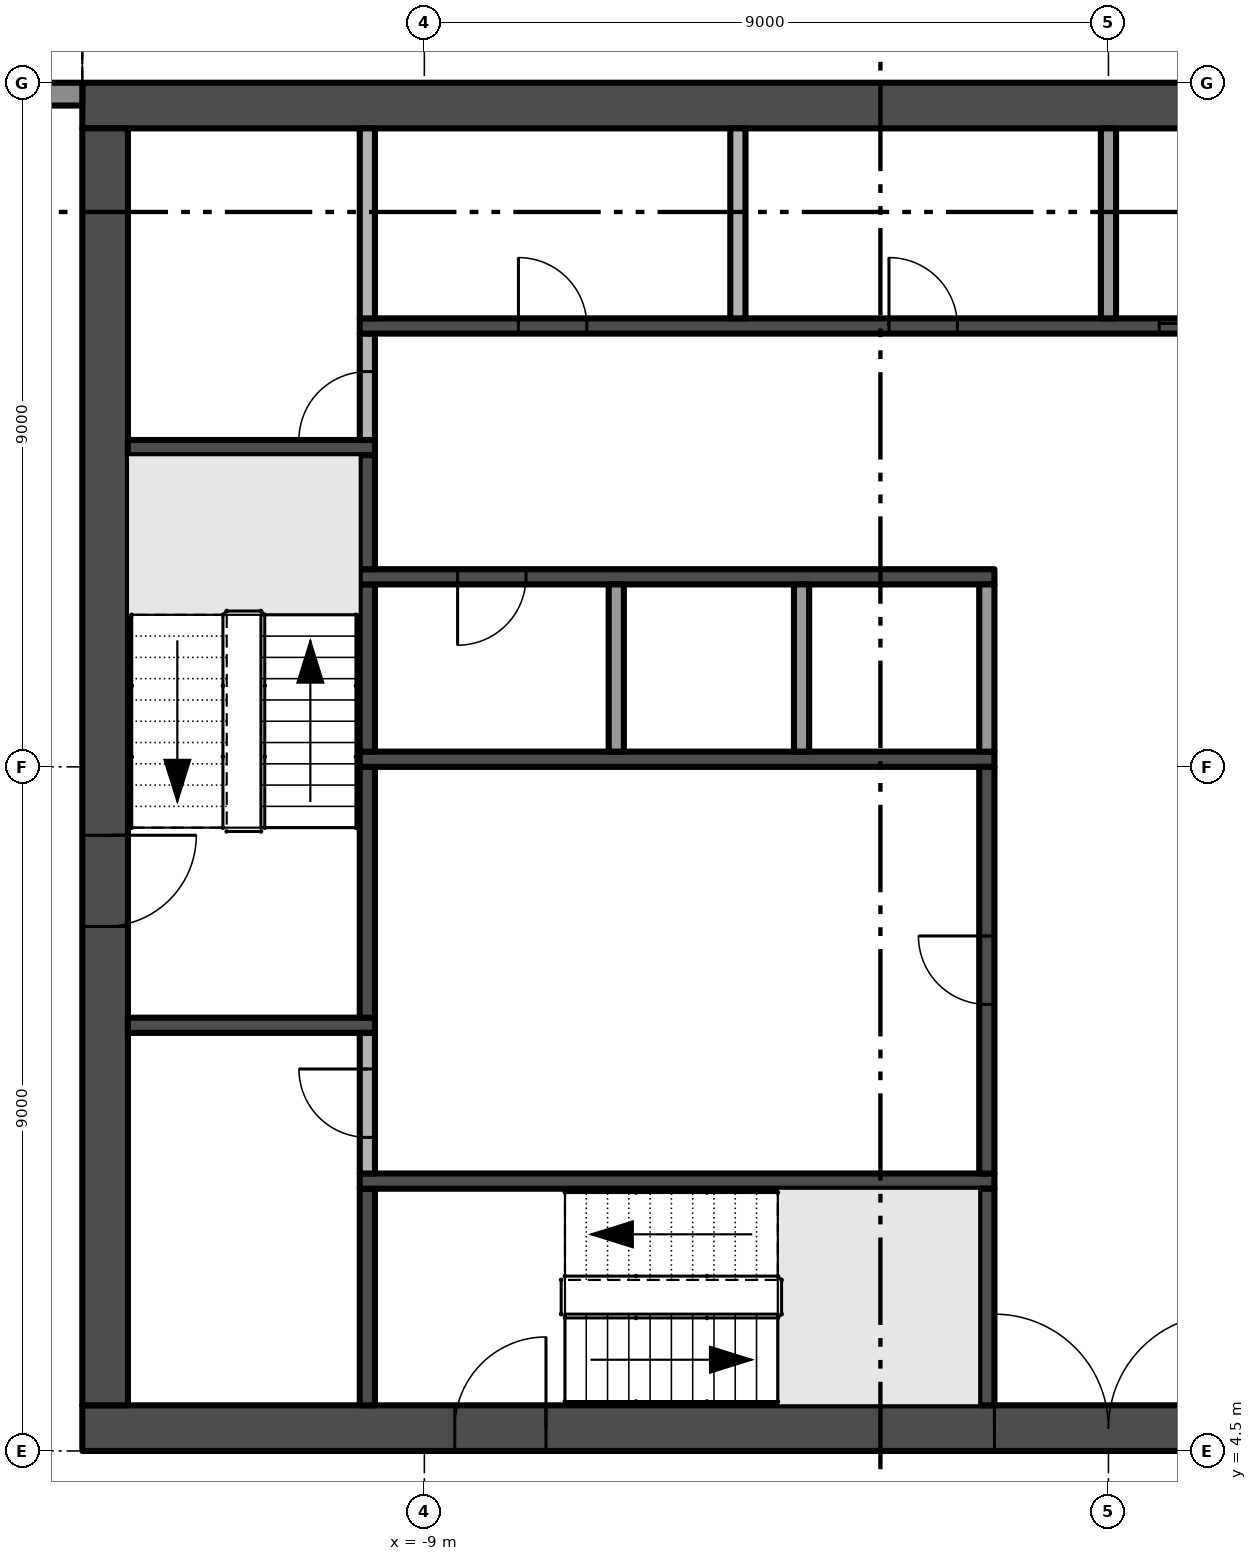
"""IFC4 building model, lengths in metres.
Left out: names, types, materials, properties, quantities, classifications, styles, units other than length and angle.
Written with IfcOpenShell. Run it as: python <this file> out.ifc"""

import sys

from ifc_helpers import new_model, si_unit, direction, frame, frame_2d, origin, place, context, subcontext, project, spatial, polyline, rectangle, outline, extrude, element, fill, save


model = new_model("IFC4")
c1 = context("Model", 3, precision=1e-05, world=origin(), true_north=direction((0.0, 1.0)))
c2 = subcontext(c1, "Body", "Model", "MODEL_VIEW")
j1 = project(units=[si_unit("LENGTHUNIT", "METRE"), si_unit("PLANEANGLEUNIT", "RADIAN")], contexts=[c1])
p1 = place(None, origin())
s1 = spatial("IfcSite", under=j1, at=p1, CompositionType="ELEMENT")
p2 = place(p1, origin())
s2 = spatial("IfcBuilding", under=s1, at=p2, CompositionType="ELEMENT")
p3 = place(p2, frame((0.0, 0.0, 199.6)))
s3 = spatial("IfcBuildingStorey", under=s2, at=p3, CompositionType="ELEMENT", Elevation=199.6)
p4 = place(p3, frame((-13.5, 4.8, -0.3), z_axis=(0.0, 0.0, 1.0), x_axis=(1.0, 0.0, 0.0)))
e1 = element("IfcWall", 1, at=p4, inside=s3, PredefinedType="SHEAR", context=c2, shape_type="SweptSolid", body=[
    extrude(rectangle(XDim=27.0, YDim=0.6, at=frame_2d((13.5, 0.0))), origin(), (0.0, 0.0, 1.0), 3.8),
])
p5 = place(p4, frame((12.0, 0.0, 0.3)))
e2 = element("IfcOpeningElement", 2, at=p5, cuts=e1, PredefinedType="OPENING", context=c2, shape_type="SweptSolid", body=[
    extrude(rectangle(XDim=3.0, YDim=2.4, at=frame_2d((1.5, 1.2))), frame((0.0, 0.31, 0.0), z_axis=(0.0, -1.0, 0.0), x_axis=(1.0, 0.0, 0.0)), (0.0, 0.0, 1.0), 0.62),
])
p6 = place(p4, frame((4.9, 0.0, 0.3)))
e3 = element("IfcOpeningElement", 3, at=p6, cuts=e1, PredefinedType="OPENING", context=c2, shape_type="SweptSolid", body=[
    extrude(rectangle(XDim=1.2, YDim=2.2, at=frame_2d((0.6, 1.1))), frame((0.0, 0.31, 0.0), z_axis=(0.0, -1.0, 0.0), x_axis=(1.0, 0.0, 0.0)), (0.0, 0.0, 1.0), 0.62),
])
p7 = place(p4, frame((20.75, 0.0, 0.3)))
e4 = element("IfcOpeningElement", 4, at=p7, cuts=e1, PredefinedType="OPENING", context=c2, shape_type="SweptSolid", body=[
    extrude(rectangle(XDim=1.5, YDim=2.2, at=frame_2d((0.75, 1.1))), frame((0.0, 0.31, 0.0), z_axis=(0.0, -1.0, 0.0), x_axis=(1.0, 0.0, 0.0)), (0.0, 0.0, 1.0), 0.62),
])
p8 = place(p4, frame((17.4, 0.0, 0.3)))
e5 = element("IfcOpeningElement", 5, at=p8, cuts=e1, PredefinedType="OPENING", context=c2, shape_type="SweptSolid", body=[
    extrude(rectangle(XDim=1.2, YDim=2.2, at=frame_2d((0.6, 1.1))), frame((0.0, 0.31, 0.0), z_axis=(0.0, -1.0, 0.0), x_axis=(1.0, 0.0, 0.0)), (0.0, 0.0, 1.0), 0.62),
])
p9 = place(p3, frame((13.5, 22.2, -0.3), z_axis=(0.0, 0.0, 1.0), x_axis=(-1.0, 0.0, 0.0)))
e6 = element("IfcWall", 6, at=p9, inside=s3, PredefinedType="SHEAR", context=c2, shape_type="SweptSolid", body=[
    extrude(rectangle(XDim=27.0, YDim=0.6, at=frame_2d((13.5, 0.0))), origin(), (0.0, 0.0, 1.0), 3.8),
])
p10 = place(p3, frame((-13.2, 21.9, -0.3), z_axis=(0.0, 0.0, 1.0), x_axis=(0.0, -1.0, 0.0)))
e7 = element("IfcWall", 7, at=p10, inside=s3, PredefinedType="SHEAR", context=c2, shape_type="SweptSolid", body=[
    extrude(rectangle(XDim=16.8, YDim=0.6, at=frame_2d((8.4, 0.0))), origin(), (0.0, 0.0, 1.0), 3.8),
])
p11 = place(p10, frame((9.3, 0.0, 0.3)))
e8 = element("IfcOpeningElement", 8, at=p11, cuts=e7, PredefinedType="OPENING", context=c2, shape_type="SweptSolid", body=[
    extrude(rectangle(XDim=1.2, YDim=2.2, at=frame_2d((0.6, 1.1))), frame((0.0, 0.31, 0.0), z_axis=(0.0, -1.0, 0.0), x_axis=(1.0, 0.0, 0.0)), (0.0, 0.0, 1.0), 0.62),
])
p12 = place(p3, frame((-17.5, 22.35, 0.0), z_axis=(0.0, 0.0, 1.0), x_axis=(1.0, 0.0, 0.0)))
e9 = element("IfcWall", 9, at=p12, inside=s3, PredefinedType="SOLIDWALL", context=c2, shape_type="SweptSolid", body=[
    extrude(rectangle(XDim=4.0, YDim=0.3, at=frame_2d((2.0, 0.0))), origin(), (0.0, 0.0, 1.0), 3.5),
])
p13 = place(p12, frame((0.3, 0.0, 0.45)))
e10 = element("IfcOpeningElement", 10, at=p13, cuts=e9, PredefinedType="OPENING", context=c2, shape_type="SweptSolid", body=[
    extrude(rectangle(XDim=3.075, YDim=2.65, at=frame_2d((1.538, 1.325))), frame((0.0, 0.16, 0.0), z_axis=(0.0, -1.0, 0.0), x_axis=(1.0, 0.0, 0.0)), (0.0, 0.0, 1.0), 0.32),
])
p14 = place(p3, origin())
e11 = element("IfcWall", 11, at=p14, inside=s3, PredefinedType="USERDEFINED", context=c2, shape_type="SweptSolid", body=[
    extrude(outline(polyline([(-13.5, 23.451), (-15.0, 23.115), (-15.375, 23.1), (-16.5, 23.231), (-18.0, 23.755), (-19.5, 24.488), (-21.0, 25.149), (-22.5, 25.485), (-22.555, 25.241), (-21.079, 24.91), (-19.605, 24.261), (-18.096, 23.524), (-16.556, 22.986), (-15.385, 22.849), (-14.967, 22.866), (-13.445, 23.208), (-13.5, 23.451)])), origin(), (0.0, 0.0, 1.0), 0.9),
])
for number, where, z_axis, x_axis in (
    (12, (-12.9, 10.1, 0.0), (0.0, 0.0, 1.0), (1.0, 0.0, 0.0)),
    (13, (-12.9, 17.7, 0.0), (0.0, 0.0, 1.0), (1.0, 0.0, 0.0)),
):
    element("IfcWall", number, at=place(p3, frame(where, z_axis=z_axis, x_axis=x_axis)), inside=s3, PredefinedType="SHEAR", context=c2, shape_type="SweptSolid", body=[
        extrude(rectangle(XDim=3.25, YDim=0.2, at=frame_2d((1.625, 0.0))), origin(), (0.0, 0.0, 1.0), 3.5),
    ])
p15 = place(p3, frame((-9.75, 5.1, 0.0), z_axis=(0.0, 0.0, 1.0), x_axis=(0.0, 1.0, 0.0)))
e14 = element("IfcWall", 14, at=p15, inside=s3, PredefinedType="SHEAR", context=c2, shape_type="SweptSolid", body=[
    extrude(rectangle(XDim=2.85, YDim=0.2, at=frame_2d((1.425, 0.0))), origin(), (0.0, 0.0, 1.0), 3.5),
])
p16 = place(p3, frame((-9.85, 8.05, 0.0), z_axis=(0.0, 0.0, 1.0), x_axis=(1.0, 0.0, 0.0)))
e15 = element("IfcWall", 15, at=p16, inside=s3, PredefinedType="SHEAR", context=c2, shape_type="SweptSolid", body=[
    extrude(rectangle(XDim=8.35, YDim=0.2, at=frame_2d((4.175, 0.0))), origin(), (0.0, 0.0, 1.0), 3.5),
])
p17 = place(p3, frame((-9.75, 8.15, 0.0), z_axis=(0.0, 0.0, 1.0), x_axis=(0.0, 1.0, 0.0)))
e16 = element("IfcWall", 16, at=p17, inside=s3, PredefinedType="PARTITIONING", context=c2, shape_type="SweptSolid", body=[
    extrude(rectangle(XDim=1.85, YDim=0.2, at=frame_2d((0.925, 0.0))), origin(), (0.0, 0.0, 1.0), 3.5),
])
p18 = place(p17, frame((0.475, 0.0, 0.0)))
e17 = element("IfcOpeningElement", 17, at=p18, cuts=e16, PredefinedType="OPENING", context=c2, shape_type="SweptSolid", body=[
    extrude(rectangle(XDim=0.9, YDim=2.1, at=frame_2d((0.45, 1.05))), frame((0.0, 0.11, 0.0), z_axis=(0.0, -1.0, 0.0), x_axis=(1.0, 0.0, 0.0)), (0.0, 0.0, 1.0), 0.22),
])
p19 = place(p3, frame((-9.75, 10.2, 0.0), z_axis=(0.0, 0.0, 1.0), x_axis=(0.0, 1.0, 0.0)))
e18 = element("IfcWall", 18, at=p19, inside=s3, PredefinedType="SHEAR", context=c2, shape_type="SweptSolid", body=[
    extrude(rectangle(XDim=3.3, YDim=0.2, at=frame_2d((1.65, 0.0))), origin(), (0.0, 0.0, 1.0), 3.5),
])
p20 = place(p3, frame((-9.85, 13.6, 0.0), z_axis=(0.0, 0.0, 1.0), x_axis=(1.0, 0.0, 0.0)))
e19 = element("IfcWall", 19, at=p20, inside=s3, PredefinedType="SHEAR", context=c2, shape_type="SweptSolid", body=[
    extrude(rectangle(XDim=8.35, YDim=0.2, at=frame_2d((4.175, 0.0))), origin(), (0.0, 0.0, 1.0), 3.5),
])
p21 = place(p3, frame((-9.75, 13.7, 0.0), z_axis=(0.0, 0.0, 1.0), x_axis=(0.0, 1.0, 0.0)))
e20 = element("IfcWall", 20, at=p21, inside=s3, PredefinedType="SHEAR", context=c2, shape_type="SweptSolid", body=[
    extrude(rectangle(XDim=2.2, YDim=0.2, at=frame_2d((1.1, 0.0))), origin(), (0.0, 0.0, 1.0), 3.5),
])
p22 = place(p3, frame((-1.5, 16.0, 0.0), z_axis=(0.0, 0.0, 1.0), x_axis=(-1.0, 0.0, 0.0)))
e21 = element("IfcWall", 21, at=p22, inside=s3, PredefinedType="SHEAR", context=c2, shape_type="SweptSolid", body=[
    extrude(rectangle(XDim=8.35, YDim=0.2, at=frame_2d((4.175, 0.0))), origin(), (0.0, 0.0, 1.0), 3.5),
])
p23 = place(p22, frame((6.162, 0.0, 0.0)))
e22 = element("IfcOpeningElement", 22, at=p23, cuts=e21, PredefinedType="OPENING", context=c2, shape_type="SweptSolid", body=[
    extrude(rectangle(XDim=0.9, YDim=2.1, at=frame_2d((0.45, 1.05))), frame((0.0, 0.11, 0.0), z_axis=(0.0, -1.0, 0.0), x_axis=(1.0, 0.0, 0.0)), (0.0, 0.0, 1.0), 0.22),
])
p24 = place(p3, frame((-9.75, 16.1, 0.0), z_axis=(0.0, 0.0, 1.0), x_axis=(0.0, 1.0, 0.0)))
e23 = element("IfcWall", 23, at=p24, inside=s3, PredefinedType="SHEAR", context=c2, shape_type="SweptSolid", body=[
    extrude(rectangle(XDim=1.5, YDim=0.2, at=frame_2d((0.75, 0.0))), origin(), (0.0, 0.0, 1.0), 3.5),
])
p25 = place(p3, frame((-9.75, 17.8, 0.0), z_axis=(0.0, 0.0, 1.0), x_axis=(0.0, 1.0, 0.0)))
e24 = element("IfcWall", 24, at=p25, inside=s3, PredefinedType="PARTITIONING", context=c2, shape_type="SweptSolid", body=[
    extrude(rectangle(XDim=1.4, YDim=0.2, at=frame_2d((0.7, 0.0))), origin(), (0.0, 0.0, 1.0), 3.5),
])
p26 = place(p25, origin())
e25 = element("IfcOpeningElement", 25, at=p26, cuts=e24, PredefinedType="OPENING", context=c2, shape_type="SweptSolid", body=[
    extrude(rectangle(XDim=0.9, YDim=2.1, at=frame_2d((0.45, 1.05))), frame((0.0, 0.11, 0.0), z_axis=(0.0, -1.0, 0.0), x_axis=(1.0, 0.0, 0.0)), (0.0, 0.0, 1.0), 0.22),
])
p27 = place(p3, frame((-9.85, 19.3, 0.0), z_axis=(0.0, 0.0, 1.0), x_axis=(1.0, 0.0, 0.0)))
e26 = element("IfcWall", 26, at=p27, inside=s3, PredefinedType="SHEAR", context=c2, shape_type="SweptSolid", body=[
    extrude(rectangle(XDim=19.7, YDim=0.2, at=frame_2d((9.85, 0.0))), origin(), (0.0, 0.0, 1.0), 3.5),
])
p28 = place(p27, frame((10.519, 0.0, 0.0)))
e27 = element("IfcOpeningElement", 27, at=p28, cuts=e26, PredefinedType="OPENING", context=c2, shape_type="SweptSolid", body=[
    extrude(rectangle(XDim=1.1, YDim=2.1, at=frame_2d((0.55, 1.05))), frame((0.0, 0.11, 0.0), z_axis=(0.0, -1.0, 0.0), x_axis=(1.0, 0.0, 0.0)), (0.0, 0.0, 1.0), 0.22),
])
p29 = place(p27, frame((12.956, 0.0, 0.0)))
e28 = element("IfcOpeningElement", 28, at=p29, cuts=e26, PredefinedType="OPENING", context=c2, shape_type="SweptSolid", body=[
    extrude(rectangle(XDim=1.1, YDim=2.1, at=frame_2d((0.55, 1.05))), frame((0.0, 0.11, 0.0), z_axis=(0.0, -1.0, 0.0), x_axis=(1.0, 0.0, 0.0)), (0.0, 0.0, 1.0), 0.22),
])
p30 = place(p27, frame((15.394, 0.0, 0.0)))
e29 = element("IfcOpeningElement", 29, at=p30, cuts=e26, PredefinedType="OPENING", context=c2, shape_type="SweptSolid", body=[
    extrude(rectangle(XDim=1.1, YDim=2.1, at=frame_2d((0.55, 1.05))), frame((0.0, 0.11, 0.0), z_axis=(0.0, -1.0, 0.0), x_axis=(1.0, 0.0, 0.0)), (0.0, 0.0, 1.0), 0.22),
])
p31 = place(p27, frame((17.831, 0.0, 0.0)))
e30 = element("IfcOpeningElement", 30, at=p31, cuts=e26, PredefinedType="OPENING", context=c2, shape_type="SweptSolid", body=[
    extrude(rectangle(XDim=1.1, YDim=2.1, at=frame_2d((0.55, 1.05))), frame((0.0, 0.11, 0.0), z_axis=(0.0, -1.0, 0.0), x_axis=(1.0, 0.0, 0.0)), (0.0, 0.0, 1.0), 0.22),
])
p32 = place(p27, frame((2.087, 0.0, 0.0)))
e31 = element("IfcOpeningElement", 31, at=p32, cuts=e26, PredefinedType="OPENING", context=c2, shape_type="SweptSolid", body=[
    extrude(rectangle(XDim=0.9, YDim=2.1, at=frame_2d((0.45, 1.05))), frame((0.0, 0.11, 0.0), z_axis=(0.0, -1.0, 0.0), x_axis=(1.0, 0.0, 0.0)), (0.0, 0.0, 1.0), 0.22),
])
p33 = place(p27, frame((6.963, 0.0, 0.0)))
e32 = element("IfcOpeningElement", 32, at=p33, cuts=e26, PredefinedType="OPENING", context=c2, shape_type="SweptSolid", body=[
    extrude(rectangle(XDim=0.9, YDim=2.1, at=frame_2d((0.45, 1.05))), frame((0.0, 0.11, 0.0), z_axis=(0.0, -1.0, 0.0), x_axis=(1.0, 0.0, 0.0)), (0.0, 0.0, 1.0), 0.22),
])
p34 = place(p3, frame((-9.75, 19.4, 0.0), z_axis=(0.0, 0.0, 1.0), x_axis=(0.0, 1.0, 0.0)))
e33 = element("IfcWall", 33, at=p34, inside=s3, PredefinedType="PARTITIONING", context=c2, shape_type="SweptSolid", body=[
    extrude(rectangle(XDim=2.5, YDim=0.2, at=frame_2d((1.25, 0.0))), origin(), (0.0, 0.0, 1.0), 3.5),
])
p35 = place(p3, frame((-6.475, 13.7, 0.0), z_axis=(0.0, 0.0, 1.0), x_axis=(0.0, 1.0, 0.0)))
e34 = element("IfcWall", 34, at=p35, inside=s3, PredefinedType="PARTITIONING", context=c2, shape_type="SweptSolid", body=[
    extrude(rectangle(XDim=2.2, YDim=0.2, at=frame_2d((1.1, 0.0))), origin(), (0.0, 0.0, 1.0), 3.5),
])
p36 = place(p3, frame((-4.875, 19.4, 0.0), z_axis=(0.0, 0.0, 1.0), x_axis=(0.0, 1.0, 0.0)))
e35 = element("IfcWall", 35, at=p36, inside=s3, PredefinedType="PARTITIONING", context=c2, shape_type="SweptSolid", body=[
    extrude(rectangle(XDim=2.5, YDim=0.2, at=frame_2d((1.25, 0.0))), origin(), (0.0, 0.0, 1.0), 3.5),
])
p37 = place(p3, frame((-4.037, 13.7, 0.0), z_axis=(0.0, 0.0, 1.0), x_axis=(0.0, 1.0, 0.0)))
e36 = element("IfcWall", 36, at=p37, inside=s3, PredefinedType="PARTITIONING", context=c2, shape_type="SweptSolid", body=[
    extrude(rectangle(XDim=2.2, YDim=0.2, at=frame_2d((1.1, 0.0))), origin(), (0.0, 0.0, 1.0), 3.5),
])
p38 = place(p3, frame((-1.6, 5.1, 0.0), z_axis=(0.0, 0.0, 1.0), x_axis=(0.0, 1.0, 0.0)))
e37 = element("IfcWall", 37, at=p38, inside=s3, PredefinedType="SHEAR", context=c2, shape_type="SweptSolid", body=[
    extrude(rectangle(XDim=2.85, YDim=0.2, at=frame_2d((1.425, 0.0))), origin(), (0.0, 0.0, 1.0), 3.5),
])
p39 = place(p3, frame((-1.6, 8.15, 0.0), z_axis=(0.0, 0.0, 1.0), x_axis=(0.0, 1.0, 0.0)))
e38 = element("IfcWall", 38, at=p39, inside=s3, PredefinedType="SHEAR", context=c2, shape_type="SweptSolid", body=[
    extrude(rectangle(XDim=5.35, YDim=0.2, at=frame_2d((2.675, 0.0))), origin(), (0.0, 0.0, 1.0), 3.5),
])
p40 = place(p39, frame((2.225, 0.0, 0.0)))
e39 = element("IfcOpeningElement", 39, at=p40, cuts=e38, PredefinedType="OPENING", context=c2, shape_type="SweptSolid", body=[
    extrude(rectangle(XDim=0.9, YDim=2.1, at=frame_2d((0.45, 1.05))), frame((0.0, 0.11, 0.0), z_axis=(0.0, -1.0, 0.0), x_axis=(1.0, 0.0, 0.0)), (0.0, 0.0, 1.0), 0.22),
])
p41 = place(p3, frame((-1.6, 13.7, 0.0), z_axis=(0.0, 0.0, 1.0), x_axis=(0.0, 1.0, 0.0)))
e40 = element("IfcWall", 40, at=p41, inside=s3, PredefinedType="PARTITIONING", context=c2, shape_type="SweptSolid", body=[
    extrude(rectangle(XDim=2.2, YDim=0.2, at=frame_2d((1.1, 0.0))), origin(), (0.0, 0.0, 1.0), 3.5),
])
p42 = place(p3, frame((0.0, 19.4, 0.0), z_axis=(0.0, 0.0, 1.0), x_axis=(0.0, 1.0, 0.0)))
e41 = element("IfcWall", 41, at=p42, inside=s3, PredefinedType="PARTITIONING", context=c2, shape_type="SweptSolid", body=[
    extrude(rectangle(XDim=2.5, YDim=0.2, at=frame_2d((1.25, 0.0))), origin(), (0.0, 0.0, 1.0), 3.5),
])
p43 = place(p5, frame((3.0, 0.0, 0.0), z_axis=(0.0, 0.0, 1.0), x_axis=(-1.0, 0.0, 0.0)))
e42 = element("IfcDoor", 42, at=p43, inside=s3, OperationType="DOUBLE_DOOR_SINGLE_SWING", PredefinedType="DOOR", context=c2, shape_type="SweptSolid", body=[
    extrude(rectangle(XDim=3.0, YDim=2.4, at=frame_2d((1.5, 1.2))), frame((0.0, 0.025, 0.0), z_axis=(0.0, -1.0, 0.0), x_axis=(1.0, 0.0, 0.0)), (0.0, 0.0, 1.0), 0.05),
])
fill(e2, e42)
p44 = place(p11, frame((1.2, 0.0, 0.0), z_axis=(0.0, 0.0, 1.0), x_axis=(-1.0, 0.0, 0.0)))
e43 = element("IfcDoor", 43, at=p44, inside=s3, OperationType="SINGLE_SWING_RIGHT", PredefinedType="DOOR", context=c2, shape_type="SweptSolid", body=[
    extrude(rectangle(XDim=1.2, YDim=2.2, at=frame_2d((0.6, 1.1))), frame((0.0, 0.025, 0.0), z_axis=(0.0, -1.0, 0.0), x_axis=(1.0, 0.0, 0.0)), (0.0, 0.0, 1.0), 0.05),
])
fill(e8, e43)
p45 = place(p6, frame((1.2, 0.0, 0.0), z_axis=(0.0, 0.0, 1.0), x_axis=(-1.0, 0.0, 0.0)))
e44 = element("IfcDoor", 44, at=p45, inside=s3, OperationType="SINGLE_SWING_LEFT", PredefinedType="DOOR", context=c2, shape_type="SweptSolid", body=[
    extrude(rectangle(XDim=1.2, YDim=2.2, at=frame_2d((0.6, 1.1))), frame((0.0, 0.025, 0.0), z_axis=(0.0, -1.0, 0.0), x_axis=(1.0, 0.0, 0.0)), (0.0, 0.0, 1.0), 0.05),
])
fill(e3, e44)
p46 = place(p28, origin())
e45 = element("IfcDoor", 45, at=p46, inside=s3, OperationType="SLIDING_TO_RIGHT", PredefinedType="DOOR", context=c2, shape_type="SweptSolid", body=[
    extrude(rectangle(XDim=1.1, YDim=2.1, at=frame_2d((0.55, 1.05))), frame((0.0, 0.025, 0.0), z_axis=(0.0, -1.0, 0.0), x_axis=(1.0, 0.0, 0.0)), (0.0, 0.0, 1.0), 0.05),
])
fill(e27, e45)
p47 = place(p40, origin())
e46 = element("IfcDoor", 46, at=p47, inside=s3, OperationType="SINGLE_SWING_RIGHT", PredefinedType="DOOR", context=c2, shape_type="SweptSolid", body=[
    extrude(rectangle(XDim=0.9, YDim=2.1, at=frame_2d((0.45, 1.05))), frame((0.0, 0.025, 0.0), z_axis=(0.0, -1.0, 0.0), x_axis=(1.0, 0.0, 0.0)), (0.0, 0.0, 1.0), 0.05),
])
fill(e39, e46)
p48 = place(p23, origin())
e47 = element("IfcDoor", 47, at=p48, inside=s3, OperationType="SINGLE_SWING_RIGHT", PredefinedType="DOOR", context=c2, shape_type="SweptSolid", body=[
    extrude(rectangle(XDim=0.9, YDim=2.1, at=frame_2d((0.45, 1.05))), frame((0.0, 0.025, 0.0), z_axis=(0.0, -1.0, 0.0), x_axis=(1.0, 0.0, 0.0)), (0.0, 0.0, 1.0), 0.05),
])
fill(e22, e47)
p49 = place(p26, origin())
e48 = element("IfcDoor", 48, at=p49, inside=s3, OperationType="SINGLE_SWING_LEFT", PredefinedType="DOOR", context=c2, shape_type="SweptSolid", body=[
    extrude(rectangle(XDim=0.9, YDim=2.1, at=frame_2d((0.45, 1.05))), frame((0.0, 0.025, 0.0), z_axis=(0.0, -1.0, 0.0), x_axis=(1.0, 0.0, 0.0)), (0.0, 0.0, 1.0), 0.05),
])
fill(e25, e48)
p50 = place(p32, origin())
e49 = element("IfcDoor", 49, at=p50, inside=s3, OperationType="SINGLE_SWING_LEFT", PredefinedType="DOOR", context=c2, shape_type="SweptSolid", body=[
    extrude(rectangle(XDim=0.9, YDim=2.1, at=frame_2d((0.45, 1.05))), frame((0.0, 0.025, 0.0), z_axis=(0.0, -1.0, 0.0), x_axis=(1.0, 0.0, 0.0)), (0.0, 0.0, 1.0), 0.05),
])
fill(e31, e49)
p51 = place(p33, origin())
e50 = element("IfcDoor", 50, at=p51, inside=s3, OperationType="SINGLE_SWING_LEFT", PredefinedType="DOOR", context=c2, shape_type="SweptSolid", body=[
    extrude(rectangle(XDim=0.9, YDim=2.1, at=frame_2d((0.45, 1.05))), frame((0.0, 0.025, 0.0), z_axis=(0.0, -1.0, 0.0), x_axis=(1.0, 0.0, 0.0)), (0.0, 0.0, 1.0), 0.05),
])
fill(e32, e50)
p52 = place(p18, origin())
e51 = element("IfcDoor", 51, at=p52, inside=s3, OperationType="SINGLE_SWING_RIGHT", PredefinedType="DOOR", context=c2, shape_type="SweptSolid", body=[
    extrude(rectangle(XDim=0.9, YDim=2.1, at=frame_2d((0.45, 1.05))), frame((0.0, 0.025, 0.0), z_axis=(0.0, -1.0, 0.0), x_axis=(1.0, 0.0, 0.0)), (0.0, 0.0, 1.0), 0.05),
])
fill(e17, e51)
save(model, sys.argv[1])
